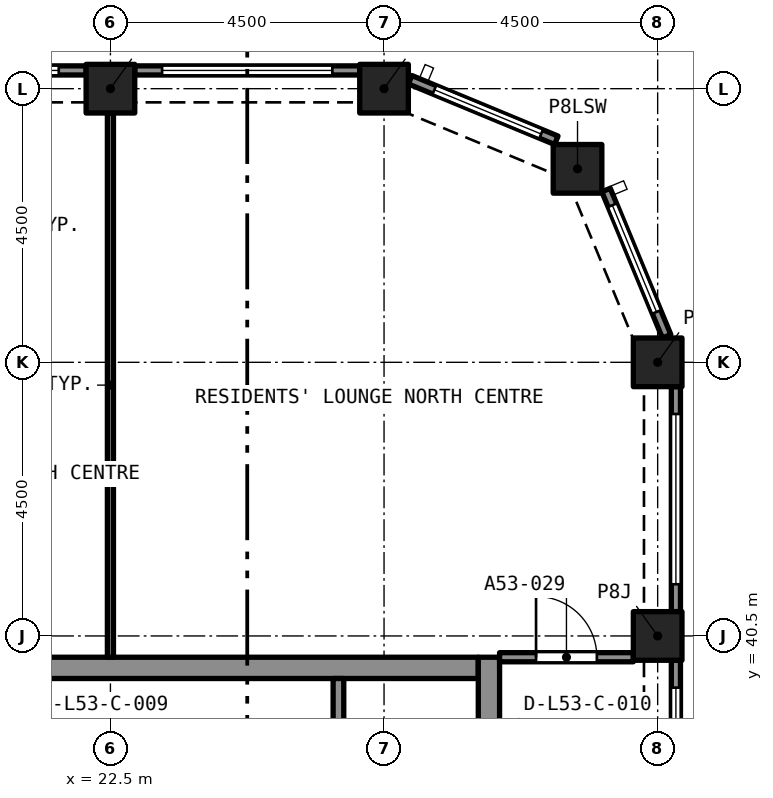
"""IFC4 building model, lengths in metres.
Left out: names, types, materials, properties, quantities, classifications, styles, units other than length and angle.
Written with IfcOpenShell. Run it as: python <this file> out.ifc"""

import sys

from ifc_helpers import new_model, si_unit, direction, frame, frame_2d, origin, origin_2d, place, context, subcontext, project, spatial, rectangle, extrude, element, fill, save


model = new_model("IFC4")
c1 = context("Model", 3, precision=1e-05, world=origin(), true_north=direction((0.0, 1.0)))
c2 = subcontext(c1, "Body", "Model", "MODEL_VIEW")
j1 = project(units=[si_unit("LENGTHUNIT", "METRE"), si_unit("PLANEANGLEUNIT", "RADIAN")], contexts=[c1])
p1 = place(None, origin())
s1 = spatial("IfcSite", under=j1, at=p1, CompositionType="ELEMENT")
p2 = place(p1, origin())
s2 = spatial("IfcBuilding", under=s1, at=p2, CompositionType="ELEMENT")
p3 = place(p2, frame((0.0, 0.0, 192.3)))
s3 = spatial("IfcBuildingStorey", under=s2, at=p3, CompositionType="ELEMENT", Elevation=192.3)
for number, where, z_axis, x_axis in (
    (1, (31.5, 40.5, 0.0), (0.0, 0.0, 1.0), (1.0, 0.0, 0.0)),
    (2, (31.5, 45.0, 0.0), (0.0, 0.0, 1.0), (1.0, 0.0, 0.0)),
    (3, (30.182, 48.182, 0.0), (0.0, 0.0, 1.0), (1.0, 0.0, 0.0)),
    (4, (22.5, 49.5, 0.0), (0.0, 0.0, 1.0), (1.0, 0.0, 0.0)),
    (5, (27.0, 49.5, 0.0), (0.0, 0.0, 1.0), (1.0, 0.0, 0.0)),
):
    element("IfcColumn", number, at=place(p3, frame(where, z_axis=z_axis, x_axis=x_axis)), inside=s3, PredefinedType="COLUMN", context=c2, shape_type="SweptSolid", body=[
        extrude(rectangle(XDim=0.8, YDim=0.8, at=origin_2d()), origin(), (0.0, 0.0, 1.0), 3.2),
    ])
p4 = place(p3, frame((20.95, 39.975, 0.0), z_axis=(0.0, 0.0, 1.0), x_axis=(1.0, 0.0, 0.0)))
e6 = element("IfcWall", 6, at=p4, inside=s3, PredefinedType="SOLIDWALL", context=c2, shape_type="SweptSolid", body=[
    extrude(rectangle(XDim=7.6, YDim=0.35, at=frame_2d((3.8, 0.0))), origin(), (0.0, 0.0, 1.0), 3.2),
])
p5 = place(p3, frame((28.725, 27.35, 0.0), z_axis=(0.0, 0.0, 1.0), x_axis=(0.0, 1.0, 0.0)))
e7 = element("IfcWall", 7, at=p5, inside=s3, PredefinedType="SOLIDWALL", context=c2, shape_type="SweptSolid", body=[
    extrude(rectangle(XDim=12.8, YDim=0.35, at=frame_2d((6.4, 0.0))), origin(), (0.0, 0.0, 1.0), 3.2),
])
p6 = place(p5, frame((8.6, 0.0, 0.0)))
e8 = element("IfcOpeningElement", 8, at=p6, cuts=e7, PredefinedType="OPENING", context=c2, shape_type="SweptSolid", body=[
    extrude(rectangle(XDim=1.2, YDim=2.1, at=frame_2d((0.6, 1.05))), frame((0.0, 0.185, 0.0), z_axis=(0.0, -1.0, 0.0), x_axis=(1.0, 0.0, 0.0)), (0.0, 0.0, 1.0), 0.37),
])
p7 = place(p3, frame((31.8, 40.1, 0.0), z_axis=(0.0, 0.0, 1.0), x_axis=(0.0, -1.0, 0.0)))
e9 = element("IfcWall", 9, at=p7, inside=s3, PredefinedType="SOLIDWALL", context=c2, shape_type="SweptSolid", body=[
    extrude(rectangle(XDim=3.7, YDim=0.15, at=frame_2d((1.85, 0.0))), origin(), (0.0, 0.0, 1.0), 3.2),
])
p8 = place(p7, frame((0.45, 0.0, 0.45)))
e10 = element("IfcOpeningElement", 10, at=p8, cuts=e9, PredefinedType="OPENING", context=c2, shape_type="SweptSolid", body=[
    extrude(rectangle(XDim=2.8, YDim=1.95, at=frame_2d((1.4, 0.975))), frame((0.0, 0.085, 0.0), z_axis=(0.0, -1.0, 0.0), x_axis=(1.0, 0.0, 0.0)), (0.0, 0.0, 1.0), 0.17),
])
p9 = place(p3, frame((31.8, 44.6, 0.0), z_axis=(0.0, 0.0, 1.0), x_axis=(0.0, -1.0, 0.0)))
e11 = element("IfcWall", 11, at=p9, inside=s3, PredefinedType="SOLIDWALL", context=c2, shape_type="SweptSolid", body=[
    extrude(rectangle(XDim=3.7, YDim=0.15, at=frame_2d((1.85, 0.0))), origin(), (0.0, 0.0, 1.0), 3.2),
])
p10 = place(p9, frame((0.45, 0.0, 0.45)))
e12 = element("IfcOpeningElement", 12, at=p10, cuts=e11, PredefinedType="OPENING", context=c2, shape_type="SweptSolid", body=[
    extrude(rectangle(XDim=2.8, YDim=1.95, at=frame_2d((1.4, 0.975))), frame((0.0, 0.085, 0.0), z_axis=(0.0, -1.0, 0.0), x_axis=(1.0, 0.0, 0.0)), (0.0, 0.0, 1.0), 0.17),
])
p11 = place(p3, frame((30.651, 47.833, 0.0), z_axis=(0.0, 0.0, 1.0), x_axis=(0.382669406082, -0.923885342263, 0.0)))
e13 = element("IfcWall", 13, at=p11, inside=s3, PredefinedType="SOLIDWALL", context=c2, shape_type="SweptSolid", body=[
    extrude(rectangle(XDim=2.602, YDim=0.15, at=frame_2d((1.301, 0.0))), origin(), (0.0, 0.0, 1.0), 3.2),
])
p12 = place(p11, frame((0.27, 0.0, 0.45)))
e14 = element("IfcOpeningElement", 14, at=p12, cuts=e13, PredefinedType="OPENING", context=c2, shape_type="SweptSolid", body=[
    extrude(rectangle(XDim=1.9, YDim=1.95, at=frame_2d((0.95, 0.975))), frame((0.0, 0.085, 0.0), z_axis=(0.0, -1.0, 0.0), x_axis=(1.0, 0.0, 0.0)), (0.0, 0.0, 1.0), 0.17),
])
p13 = place(p3, frame((27.429, 49.647, 0.0), z_axis=(0.0, 0.0, 1.0), x_axis=(0.923885342263, -0.382669406082, 0.0)))
e15 = element("IfcWall", 15, at=p13, inside=s3, PredefinedType="SOLIDWALL", context=c2, shape_type="SweptSolid", body=[
    extrude(rectangle(XDim=2.602, YDim=0.15, at=frame_2d((1.301, 0.0))), origin(), (0.0, 0.0, 1.0), 3.2),
])
p14 = place(p13, frame((0.432, 0.0, 0.45)))
e16 = element("IfcOpeningElement", 16, at=p14, cuts=e15, PredefinedType="OPENING", context=c2, shape_type="SweptSolid", body=[
    extrude(rectangle(XDim=1.9, YDim=1.95, at=frame_2d((0.95, 0.975))), frame((0.0, 0.085, 0.0), z_axis=(0.0, -1.0, 0.0), x_axis=(1.0, 0.0, 0.0)), (0.0, 0.0, 1.0), 0.17),
])
p15 = place(p3, frame((22.9, 49.8, 0.0), z_axis=(0.0, 0.0, 1.0), x_axis=(1.0, 0.0, 0.0)))
e17 = element("IfcWall", 17, at=p15, inside=s3, PredefinedType="SOLIDWALL", context=c2, shape_type="SweptSolid", body=[
    extrude(rectangle(XDim=3.7, YDim=0.15, at=frame_2d((1.85, 0.0))), origin(), (0.0, 0.0, 1.0), 3.2),
])
p16 = place(p15, frame((0.45, 0.0, 0.45)))
e18 = element("IfcOpeningElement", 18, at=p16, cuts=e17, PredefinedType="OPENING", context=c2, shape_type="SweptSolid", body=[
    extrude(rectangle(XDim=2.8, YDim=1.95, at=frame_2d((1.4, 0.975))), frame((0.0, 0.085, 0.0), z_axis=(0.0, -1.0, 0.0), x_axis=(1.0, 0.0, 0.0)), (0.0, 0.0, 1.0), 0.17),
])
p17 = place(p3, frame((18.4, 49.8, 0.0), z_axis=(0.0, 0.0, 1.0), x_axis=(1.0, 0.0, 0.0)))
e19 = element("IfcWall", 19, at=p17, inside=s3, PredefinedType="SOLIDWALL", context=c2, shape_type="SweptSolid", body=[
    extrude(rectangle(XDim=3.7, YDim=0.15, at=frame_2d((1.85, 0.0))), origin(), (0.0, 0.0, 1.0), 3.2),
])
p18 = place(p17, frame((0.45, 0.0, 0.45)))
e20 = element("IfcOpeningElement", 20, at=p18, cuts=e19, PredefinedType="OPENING", context=c2, shape_type="SweptSolid", body=[
    extrude(rectangle(XDim=2.8, YDim=1.95, at=frame_2d((1.4, 0.975))), frame((0.0, 0.085, 0.0), z_axis=(0.0, -1.0, 0.0), x_axis=(1.0, 0.0, 0.0)), (0.0, 0.0, 1.0), 0.17),
])
p19 = place(p3, frame((28.9, 40.15, 0.0), z_axis=(0.0, 0.0, 1.0), x_axis=(1.0, 0.0, 0.0)))
e21 = element("IfcWall", 21, at=p19, inside=s3, PredefinedType="PARTITIONING", context=c2, shape_type="SweptSolid", body=[
    extrude(rectangle(XDim=2.2, YDim=0.15, at=frame_2d((1.1, 0.0))), origin(), (0.0, 0.0, 1.0), 2.75),
])
p20 = place(p19, frame((0.6, 0.0, 0.0)))
e22 = element("IfcOpeningElement", 22, at=p20, cuts=e21, PredefinedType="OPENING", context=c2, shape_type="SweptSolid", body=[
    extrude(rectangle(XDim=1.0, YDim=2.1, at=frame_2d((0.5, 1.05))), frame((0.0, 0.085, 0.0), z_axis=(0.0, -1.0, 0.0), x_axis=(1.0, 0.0, 0.0)), (0.0, 0.0, 1.0), 0.17),
])
p21 = place(p3, frame((22.5, 40.15, 0.0), z_axis=(0.0, 0.0, 1.0), x_axis=(0.0, 1.0, 0.0)))
e23 = element("IfcWall", 23, at=p21, inside=s3, PredefinedType="PARTITIONING", context=c2, shape_type="SweptSolid", body=[
    extrude(rectangle(XDim=8.95, YDim=0.1, at=frame_2d((4.475, 0.0))), origin(), (0.0, 0.0, 1.0), 2.75),
])
p22 = place(p3, frame((26.25, 37.5, 0.0), z_axis=(0.0, 0.0, 1.0), x_axis=(0.0, 1.0, 0.0)))
e24 = element("IfcWall", 24, at=p22, inside=s3, PredefinedType="SOLIDWALL", context=c2, shape_type="SweptSolid", body=[
    extrude(rectangle(XDim=2.3, YDim=0.175, at=frame_2d((1.15, 0.0))), origin(), (0.0, 0.0, 1.0), 2.9),
])
p23 = place(p8, origin())
e25 = element("IfcWindow", 25, at=p23, inside=s3, PartitioningType="SINGLE_PANEL", PredefinedType="WINDOW", context=c2, shape_type="SweptSolid", body=[
    extrude(rectangle(XDim=2.8, YDim=1.95, at=frame_2d((1.4, 0.975))), frame((0.0, 0.03, 0.0), z_axis=(0.0, -1.0, 0.0), x_axis=(1.0, 0.0, 0.0)), (0.0, 0.0, 1.0), 0.06),
])
fill(e10, e25)
p24 = place(p10, origin())
e26 = element("IfcWindow", 26, at=p24, inside=s3, PartitioningType="SINGLE_PANEL", PredefinedType="WINDOW", context=c2, shape_type="SweptSolid", body=[
    extrude(rectangle(XDim=2.8, YDim=1.95, at=frame_2d((1.4, 0.975))), frame((0.0, 0.03, 0.0), z_axis=(0.0, -1.0, 0.0), x_axis=(1.0, 0.0, 0.0)), (0.0, 0.0, 1.0), 0.06),
])
fill(e12, e26)
p25 = place(p12, origin())
e27 = element("IfcWindow", 27, at=p25, inside=s3, PartitioningType="SINGLE_PANEL", PredefinedType="WINDOW", context=c2, shape_type="SweptSolid", body=[
    extrude(rectangle(XDim=1.9, YDim=1.95, at=frame_2d((0.95, 0.975))), frame((0.0, 0.03, 0.0), z_axis=(0.0, -1.0, 0.0), x_axis=(1.0, 0.0, 0.0)), (0.0, 0.0, 1.0), 0.06),
])
fill(e14, e27)
p26 = place(p14, origin())
e28 = element("IfcWindow", 28, at=p26, inside=s3, PartitioningType="SINGLE_PANEL", PredefinedType="WINDOW", context=c2, shape_type="SweptSolid", body=[
    extrude(rectangle(XDim=1.9, YDim=1.95, at=frame_2d((0.95, 0.975))), frame((0.0, 0.03, 0.0), z_axis=(0.0, -1.0, 0.0), x_axis=(1.0, 0.0, 0.0)), (0.0, 0.0, 1.0), 0.06),
])
fill(e16, e28)
p27 = place(p16, origin())
e29 = element("IfcWindow", 29, at=p27, inside=s3, PartitioningType="SINGLE_PANEL", PredefinedType="WINDOW", context=c2, shape_type="SweptSolid", body=[
    extrude(rectangle(XDim=2.8, YDim=1.95, at=frame_2d((1.4, 0.975))), frame((0.0, 0.03, 0.0), z_axis=(0.0, -1.0, 0.0), x_axis=(1.0, 0.0, 0.0)), (0.0, 0.0, 1.0), 0.06),
])
fill(e18, e29)
p28 = place(p18, origin())
e30 = element("IfcWindow", 30, at=p28, inside=s3, PartitioningType="SINGLE_PANEL", PredefinedType="WINDOW", context=c2, shape_type="SweptSolid", body=[
    extrude(rectangle(XDim=2.8, YDim=1.95, at=frame_2d((1.4, 0.975))), frame((0.0, 0.03, 0.0), z_axis=(0.0, -1.0, 0.0), x_axis=(1.0, 0.0, 0.0)), (0.0, 0.0, 1.0), 0.06),
])
fill(e20, e30)
p29 = place(p20, origin())
e31 = element("IfcDoor", 31, at=p29, inside=s3, OperationType="SINGLE_SWING_RIGHT", PredefinedType="DOOR", context=c2, shape_type="SweptSolid", body=[
    extrude(rectangle(XDim=1.0, YDim=2.1, at=frame_2d((0.5, 1.05))), frame((0.0, 0.025, 0.0), z_axis=(0.0, -1.0, 0.0), x_axis=(1.0, 0.0, 0.0)), (0.0, 0.0, 1.0), 0.05),
])
fill(e22, e31)
save(model, sys.argv[1])
